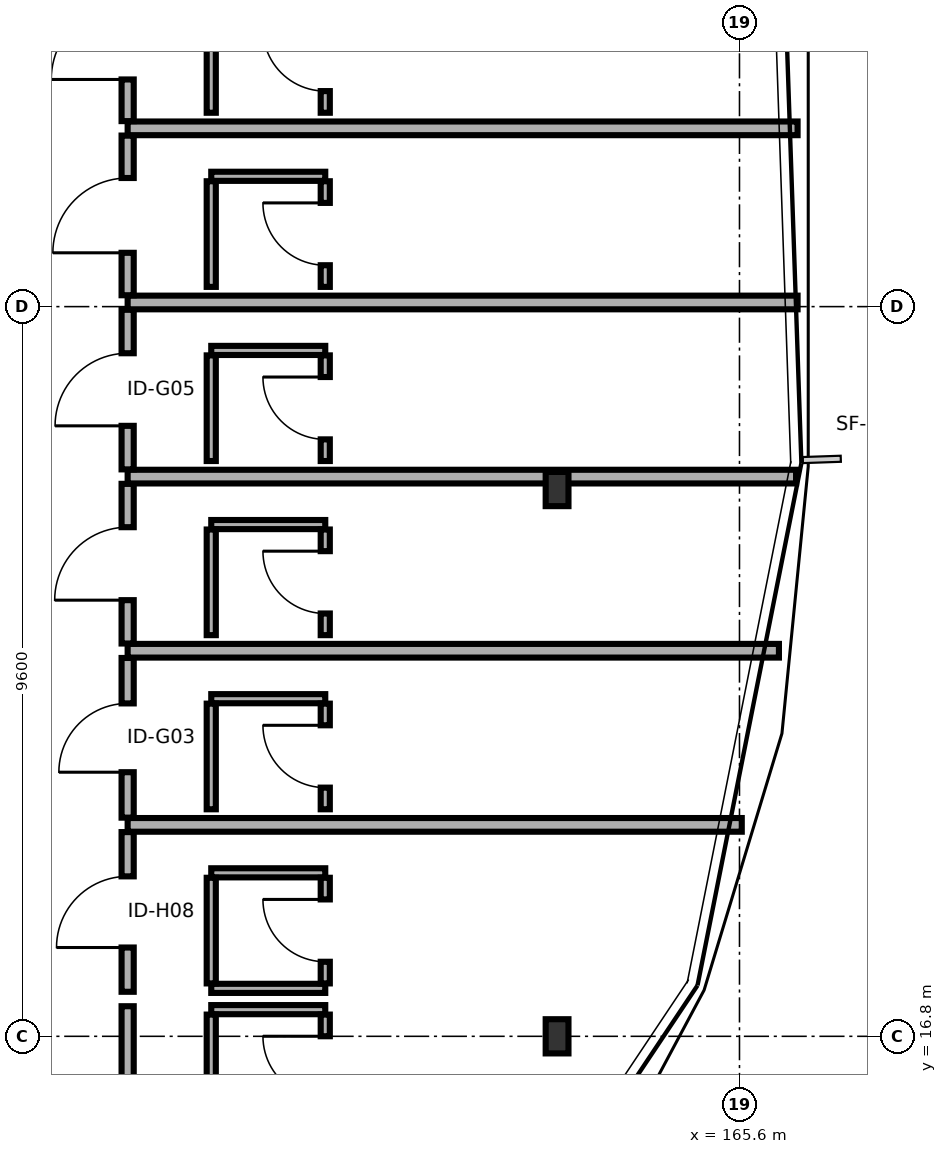
"""IFC4 building model, lengths in metres.
Left out: names, types, materials, properties, quantities, classifications, styles, units other than length and angle.
Written with IfcOpenShell. Run it as: python <this file> out.ifc"""

import sys

from ifc_helpers import new_model, si_unit, direction, frame, frame_2d, origin, origin_2d, place, context, subcontext, project, spatial, rectangle, i_section, extrude, element, fill, save


model = new_model("IFC4")
c1 = context("Model", 3, precision=1e-05, world=origin(), true_north=direction((0.0, 1.0)))
c2 = subcontext(c1, "Body", "Model", "MODEL_VIEW")
j1 = project(units=[si_unit("LENGTHUNIT", "METRE"), si_unit("PLANEANGLEUNIT", "RADIAN")], contexts=[c1])
p1 = place(None, origin())
s1 = spatial("IfcSite", under=j1, at=p1, CompositionType="ELEMENT")
p2 = place(p1, origin())
s2 = spatial("IfcBuilding", under=s1, at=p2, CompositionType="ELEMENT")
p3 = place(p2, frame((0.0, 0.0, 28.3)))
s3 = spatial("IfcBuildingStorey", under=s2, at=p3, CompositionType="ELEMENT", Elevation=28.3)
for number, where, z_axis, x_axis in (
    (1, (163.2, 16.8, 0.0), (0.0, 0.0, 1.0), (1.0, 0.0, 0.0)),
    (2, (163.2, 24.0, 0.0), (0.0, 0.0, 1.0), (1.0, 0.0, 0.0)),
):
    element("IfcColumn", number, at=place(p3, frame(where, z_axis=z_axis, x_axis=x_axis)), inside=s3, PredefinedType="COLUMN", context=c2, shape_type="SweptSolid", body=[
        extrude(i_section(OverallWidth=0.3, OverallDepth=0.45, WebThickness=0.014, FlangeThickness=0.026, FilletRadius=0.027, at=origin_2d()), origin(), (0.0, 0.0, 1.0), 3.4),
    ])
p4 = place(p3, frame((157.55, 15.095, 0.0), z_axis=(0.0, 0.0, 1.0), x_axis=(0.0, 1.0, 0.0)))
e3 = element("IfcWall", 3, at=p4, inside=s3, PredefinedType="PARTITIONING", context=c2, shape_type="SweptSolid", body=[
    extrude(rectangle(XDim=2.101, YDim=0.16, at=frame_2d((1.05, 0.0))), origin(), (0.0, 0.0, 1.0), 2.71),
])
p5 = place(p4, frame((0.16, 0.0, 0.0)))
e4 = element("IfcOpeningElement", 4, at=p5, cuts=e3, PredefinedType="OPENING", context=c2, shape_type="SweptSolid", body=[
    extrude(rectangle(XDim=0.855, YDim=2.05, at=frame_2d((0.427, 1.025))), frame((0.0, 0.09, 0.0), z_axis=(0.0, -1.0, 0.0), x_axis=(1.0, 0.0, 0.0)), (0.0, 0.0, 1.0), 0.18),
])
p6 = place(p3, frame((158.65, 17.151, 0.0), z_axis=(0.0, 0.0, 1.0), x_axis=(1.0, 0.0, 0.0)))
e5 = element("IfcWall", 5, at=p6, inside=s3, PredefinedType="PARTITIONING", context=c2, shape_type="SweptSolid", body=[
    extrude(rectangle(XDim=1.5, YDim=0.12, at=frame_2d((0.75, 0.0))), origin(), (0.0, 0.0, 1.0), 3.175),
])
p7 = place(p3, frame((158.65, 15.696, 0.0), z_axis=(0.0, 0.0, 1.0), x_axis=(0.0, 1.0, 0.0)))
e6 = element("IfcWall", 6, at=p7, inside=s3, PredefinedType="PARTITIONING", context=c2, shape_type="SweptSolid", body=[
    extrude(rectangle(XDim=1.39, YDim=0.12, at=frame_2d((0.695, 0.0))), origin(), (0.0, 0.0, 1.0), 2.71),
])
p8 = place(p3, frame((160.15, 15.696, 0.0), z_axis=(0.0, 0.0, 1.0), x_axis=(0.0, 1.0, 0.0)))
e7 = element("IfcWall", 7, at=p8, inside=s3, PredefinedType="PARTITIONING", context=c2, shape_type="SweptSolid", body=[
    extrude(rectangle(XDim=1.39, YDim=0.12, at=frame_2d((0.695, 0.0))), origin(), (0.0, 0.0, 1.0), 2.71),
])
p9 = place(p8, frame((0.285, 0.0, 0.0)))
e8 = element("IfcOpeningElement", 8, at=p9, cuts=e7, PredefinedType="OPENING", context=c2, shape_type="SweptSolid", body=[
    extrude(rectangle(XDim=0.82, YDim=2.08, at=frame_2d((0.41, 1.04))), frame((0.0, 0.07, 0.0), z_axis=(0.0, -1.0, 0.0), x_axis=(1.0, 0.0, 0.0)), (0.0, 0.0, 1.0), 0.14),
])
p10 = place(p3, frame((157.55, 17.386, 0.0), z_axis=(0.0, 0.0, 1.0), x_axis=(0.0, 1.0, 0.0)))
e9 = element("IfcWall", 9, at=p10, inside=s3, PredefinedType="PARTITIONING", context=c2, shape_type="SweptSolid", body=[
    extrude(rectangle(XDim=2.101, YDim=0.16, at=frame_2d((1.05, 0.0))), origin(), (0.0, 0.0, 1.0), 3.175),
])
p11 = place(p10, frame((0.583, 0.0, 0.0)))
e10 = element("IfcOpeningElement", 10, at=p11, cuts=e9, PredefinedType="OPENING", context=c2, shape_type="SweptSolid", body=[
    extrude(rectangle(XDim=0.936, YDim=2.07, at=frame_2d((0.468, 1.035))), frame((0.0, 0.09, 0.0), z_axis=(0.0, -1.0, 0.0), x_axis=(1.0, 0.0, 0.0)), (0.0, 0.0, 1.0), 0.18),
])
for number, where, z_axis, x_axis in (
    (11, (158.65, 17.431, 0.0), (0.0, 0.0, 1.0), (1.0, 0.0, 0.0)),
    (12, (158.65, 18.951, 0.0), (0.0, 0.0, 1.0), (1.0, 0.0, 0.0)),
):
    element("IfcWall", number, at=place(p3, frame(where, z_axis=z_axis, x_axis=x_axis)), inside=s3, PredefinedType="PARTITIONING", context=c2, shape_type="SweptSolid", body=[
        extrude(rectangle(XDim=1.5, YDim=0.12, at=frame_2d((0.75, 0.0))), origin(), (0.0, 0.0, 1.0), 3.175),
    ])
p12 = place(p3, frame((158.65, 17.496, 0.0), z_axis=(0.0, 0.0, 1.0), x_axis=(0.0, 1.0, 0.0)))
e13 = element("IfcWall", 13, at=p12, inside=s3, PredefinedType="PARTITIONING", context=c2, shape_type="SweptSolid", body=[
    extrude(rectangle(XDim=1.39, YDim=0.12, at=frame_2d((0.695, 0.0))), origin(), (0.0, 0.0, 1.0), 3.175),
])
p13 = place(p3, frame((160.15, 17.496, 0.0), z_axis=(0.0, 0.0, 1.0), x_axis=(0.0, 1.0, 0.0)))
e14 = element("IfcWall", 14, at=p13, inside=s3, PredefinedType="PARTITIONING", context=c2, shape_type="SweptSolid", body=[
    extrude(rectangle(XDim=1.39, YDim=0.12, at=frame_2d((0.695, 0.0))), origin(), (0.0, 0.0, 1.0), 3.175),
])
p14 = place(p13, frame((0.285, 0.0, 0.0)))
e15 = element("IfcOpeningElement", 15, at=p14, cuts=e14, PredefinedType="OPENING", context=c2, shape_type="SweptSolid", body=[
    extrude(rectangle(XDim=0.82, YDim=2.08, at=frame_2d((0.41, 1.04))), frame((0.0, 0.07, 0.0), z_axis=(0.0, -1.0, 0.0), x_axis=(1.0, 0.0, 0.0)), (0.0, 0.0, 1.0), 0.14),
])
p15 = place(p3, frame((157.55, 19.582, 0.0), z_axis=(0.0, 0.0, 1.0), x_axis=(1.0, 0.0, 0.0)))
e16 = element("IfcWall", 16, at=p15, inside=s3, PredefinedType="PARTITIONING", context=c2, shape_type="SweptSolid", body=[
    extrude(rectangle(XDim=8.08, YDim=0.18, at=frame_2d((4.04, 0.0))), origin(), (0.0, 0.0, 1.0), 2.66),
])
p16 = place(p3, frame((157.55, 19.677, 0.0), z_axis=(0.0, 0.0, 1.0), x_axis=(0.0, 1.0, 0.0)))
e17 = element("IfcWall", 17, at=p16, inside=s3, PredefinedType="PARTITIONING", context=c2, shape_type="SweptSolid", body=[
    extrude(rectangle(XDim=2.101, YDim=0.16, at=frame_2d((1.05, 0.0))), origin(), (0.0, 0.0, 1.0), 3.175),
])
p17 = place(p16, frame((0.598, 0.0, 0.0)))
e18 = element("IfcOpeningElement", 18, at=p17, cuts=e17, PredefinedType="OPENING", context=c2, shape_type="SweptSolid", body=[
    extrude(rectangle(XDim=0.905, YDim=2.05, at=frame_2d((0.453, 1.025))), frame((0.0, 0.09, 0.0), z_axis=(0.0, -1.0, 0.0), x_axis=(1.0, 0.0, 0.0)), (0.0, 0.0, 1.0), 0.18),
])
p18 = place(p3, frame((158.65, 21.242, 0.0), z_axis=(0.0, 0.0, 1.0), x_axis=(1.0, 0.0, 0.0)))
e19 = element("IfcWall", 19, at=p18, inside=s3, PredefinedType="PARTITIONING", context=c2, shape_type="SweptSolid", body=[
    extrude(rectangle(XDim=1.5, YDim=0.12, at=frame_2d((0.75, 0.0))), origin(), (0.0, 0.0, 1.0), 3.175),
])
p19 = place(p3, frame((158.65, 19.787, 0.0), z_axis=(0.0, 0.0, 1.0), x_axis=(0.0, 1.0, 0.0)))
e20 = element("IfcWall", 20, at=p19, inside=s3, PredefinedType="PARTITIONING", context=c2, shape_type="SweptSolid", body=[
    extrude(rectangle(XDim=1.39, YDim=0.12, at=frame_2d((0.695, 0.0))), origin(), (0.0, 0.0, 1.0), 3.175),
])
p20 = place(p3, frame((160.15, 19.787, 0.0), z_axis=(0.0, 0.0, 1.0), x_axis=(0.0, 1.0, 0.0)))
e21 = element("IfcWall", 21, at=p20, inside=s3, PredefinedType="PARTITIONING", context=c2, shape_type="SweptSolid", body=[
    extrude(rectangle(XDim=1.39, YDim=0.12, at=frame_2d((0.695, 0.0))), origin(), (0.0, 0.0, 1.0), 3.175),
])
p21 = place(p20, frame((0.285, 0.0, 0.0)))
e22 = element("IfcOpeningElement", 22, at=p21, cuts=e21, PredefinedType="OPENING", context=c2, shape_type="SweptSolid", body=[
    extrude(rectangle(XDim=0.82, YDim=2.08, at=frame_2d((0.41, 1.04))), frame((0.0, 0.07, 0.0), z_axis=(0.0, -1.0, 0.0), x_axis=(1.0, 0.0, 0.0)), (0.0, 0.0, 1.0), 0.14),
])
p22 = place(p3, frame((157.55, 21.873, 0.0), z_axis=(0.0, 0.0, 1.0), x_axis=(1.0, 0.0, 0.0)))
e23 = element("IfcWall", 23, at=p22, inside=s3, PredefinedType="PARTITIONING", context=c2, shape_type="SweptSolid", body=[
    extrude(rectangle(XDim=8.569, YDim=0.18, at=frame_2d((4.284, 0.0))), origin(), (0.0, 0.0, 1.0), 2.66),
])
p23 = place(p3, frame((157.55, 21.968, 0.0), z_axis=(0.0, 0.0, 1.0), x_axis=(0.0, 1.0, 0.0)))
e24 = element("IfcWall", 24, at=p23, inside=s3, PredefinedType="PARTITIONING", context=c2, shape_type="SweptSolid", body=[
    extrude(rectangle(XDim=2.101, YDim=0.16, at=frame_2d((1.05, 0.0))), origin(), (0.0, 0.0, 1.0), 2.71),
])
p24 = place(p23, frame((0.57, 0.0, 0.0)))
e25 = element("IfcOpeningElement", 25, at=p24, cuts=e24, PredefinedType="OPENING", context=c2, shape_type="SweptSolid", body=[
    extrude(rectangle(XDim=0.96, YDim=2.13, at=frame_2d((0.48, 1.065))), frame((0.0, 0.09, 0.0), z_axis=(0.0, -1.0, 0.0), x_axis=(1.0, 0.0, 0.0)), (0.0, 0.0, 1.0), 0.18),
])
p25 = place(p3, frame((158.65, 23.533, 0.0), z_axis=(0.0, 0.0, 1.0), x_axis=(1.0, 0.0, 0.0)))
e26 = element("IfcWall", 26, at=p25, inside=s3, PredefinedType="PARTITIONING", context=c2, shape_type="SweptSolid", body=[
    extrude(rectangle(XDim=1.5, YDim=0.12, at=frame_2d((0.75, 0.0))), origin(), (0.0, 0.0, 1.0), 3.175),
])
p26 = place(p3, frame((158.65, 22.078, 0.0), z_axis=(0.0, 0.0, 1.0), x_axis=(0.0, 1.0, 0.0)))
e27 = element("IfcWall", 27, at=p26, inside=s3, PredefinedType="PARTITIONING", context=c2, shape_type="SweptSolid", body=[
    extrude(rectangle(XDim=1.39, YDim=0.12, at=frame_2d((0.695, 0.0))), origin(), (0.0, 0.0, 1.0), 3.175),
])
p27 = place(p3, frame((160.15, 22.078, 0.0), z_axis=(0.0, 0.0, 1.0), x_axis=(0.0, 1.0, 0.0)))
e28 = element("IfcWall", 28, at=p27, inside=s3, PredefinedType="PARTITIONING", context=c2, shape_type="SweptSolid", body=[
    extrude(rectangle(XDim=1.39, YDim=0.12, at=frame_2d((0.695, 0.0))), origin(), (0.0, 0.0, 1.0), 3.175),
])
p28 = place(p27, frame((0.285, 0.0, 0.0)))
e29 = element("IfcOpeningElement", 29, at=p28, cuts=e28, PredefinedType="OPENING", context=c2, shape_type="SweptSolid", body=[
    extrude(rectangle(XDim=0.82, YDim=2.08, at=frame_2d((0.41, 1.04))), frame((0.0, 0.07, 0.0), z_axis=(0.0, -1.0, 0.0), x_axis=(1.0, 0.0, 0.0)), (0.0, 0.0, 1.0), 0.14),
])
p29 = place(p3, frame((157.55, 24.164, 0.0), z_axis=(0.0, 0.0, 1.0), x_axis=(1.0, 0.0, 0.0)))
e30 = element("IfcWall", 30, at=p29, inside=s3, PredefinedType="PARTITIONING", context=c2, shape_type="SweptSolid", body=[
    extrude(rectangle(XDim=8.794, YDim=0.18, at=frame_2d((4.397, 0.0))), origin(), (0.0, 0.0, 1.0), 2.66),
])
p30 = place(p3, frame((157.55, 24.259, 0.0), z_axis=(0.0, 0.0, 1.0), x_axis=(0.0, 1.0, 0.0)))
e31 = element("IfcWall", 31, at=p30, inside=s3, PredefinedType="PARTITIONING", context=c2, shape_type="SweptSolid", body=[
    extrude(rectangle(XDim=2.101, YDim=0.16, at=frame_2d((1.051, 0.0))), origin(), (0.0, 0.0, 1.0), 3.175),
])
p31 = place(p30, frame((0.573, 0.0, 0.0)))
e32 = element("IfcOpeningElement", 32, at=p31, cuts=e31, PredefinedType="OPENING", context=c2, shape_type="SweptSolid", body=[
    extrude(rectangle(XDim=0.955, YDim=2.05, at=frame_2d((0.478, 1.025))), frame((0.0, 0.09, 0.0), z_axis=(0.0, -1.0, 0.0), x_axis=(1.0, 0.0, 0.0)), (0.0, 0.0, 1.0), 0.18),
])
p32 = place(p3, frame((158.65, 25.823, 0.0), z_axis=(0.0, 0.0, 1.0), x_axis=(1.0, 0.0, 0.0)))
e33 = element("IfcWall", 33, at=p32, inside=s3, PredefinedType="PARTITIONING", context=c2, shape_type="SweptSolid", body=[
    extrude(rectangle(XDim=1.5, YDim=0.12, at=frame_2d((0.75, 0.0))), origin(), (0.0, 0.0, 1.0), 3.175),
])
p33 = place(p3, frame((158.65, 24.369, 0.0), z_axis=(0.0, 0.0, 1.0), x_axis=(0.0, 1.0, 0.0)))
e34 = element("IfcWall", 34, at=p33, inside=s3, PredefinedType="PARTITIONING", context=c2, shape_type="SweptSolid", body=[
    extrude(rectangle(XDim=1.39, YDim=0.12, at=frame_2d((0.695, 0.0))), origin(), (0.0, 0.0, 1.0), 3.175),
])
p34 = place(p3, frame((160.15, 24.369, 0.0), z_axis=(0.0, 0.0, 1.0), x_axis=(0.0, 1.0, 0.0)))
e35 = element("IfcWall", 35, at=p34, inside=s3, PredefinedType="PARTITIONING", context=c2, shape_type="SweptSolid", body=[
    extrude(rectangle(XDim=1.39, YDim=0.12, at=frame_2d((0.695, 0.0))), origin(), (0.0, 0.0, 1.0), 3.175),
])
p35 = place(p34, frame((0.285, 0.0, 0.0)))
e36 = element("IfcOpeningElement", 36, at=p35, cuts=e35, PredefinedType="OPENING", context=c2, shape_type="SweptSolid", body=[
    extrude(rectangle(XDim=0.82, YDim=2.08, at=frame_2d((0.41, 1.04))), frame((0.0, 0.07, 0.0), z_axis=(0.0, -1.0, 0.0), x_axis=(1.0, 0.0, 0.0)), (0.0, 0.0, 1.0), 0.14),
])
p36 = place(p3, frame((157.55, 26.455, 0.0), z_axis=(0.0, 0.0, 1.0), x_axis=(1.0, 0.0, 0.0)))
e37 = element("IfcWall", 37, at=p36, inside=s3, PredefinedType="PARTITIONING", context=c2, shape_type="SweptSolid", body=[
    extrude(rectangle(XDim=8.814, YDim=0.18, at=frame_2d((4.407, 0.0))), origin(), (0.0, 0.0, 1.0), 2.66),
])
p37 = place(p3, frame((157.55, 26.55, 0.0), z_axis=(0.0, 0.0, 1.0), x_axis=(0.0, 1.0, 0.0)))
e38 = element("IfcWall", 38, at=p37, inside=s3, PredefinedType="PARTITIONING", context=c2, shape_type="SweptSolid", body=[
    extrude(rectangle(XDim=2.101, YDim=0.16, at=frame_2d((1.05, 0.0))), origin(), (0.0, 0.0, 1.0), 3.175),
])
p38 = place(p37, frame((0.559, 0.0, 0.0)))
e39 = element("IfcOpeningElement", 39, at=p38, cuts=e38, PredefinedType="OPENING", context=c2, shape_type="SweptSolid", body=[
    extrude(rectangle(XDim=0.984, YDim=2.07, at=frame_2d((0.492, 1.035))), frame((0.0, 0.09, 0.0), z_axis=(0.0, -1.0, 0.0), x_axis=(1.0, 0.0, 0.0)), (0.0, 0.0, 1.0), 0.18),
])
p39 = place(p3, frame((158.65, 28.115, 0.0), z_axis=(0.0, 0.0, 1.0), x_axis=(1.0, 0.0, 0.0)))
e40 = element("IfcWall", 40, at=p39, inside=s3, PredefinedType="PARTITIONING", context=c2, shape_type="SweptSolid", body=[
    extrude(rectangle(XDim=1.5, YDim=0.12, at=frame_2d((0.75, 0.0))), origin(), (0.0, 0.0, 1.0), 3.175),
])
p40 = place(p3, frame((158.65, 26.659, 0.0), z_axis=(0.0, 0.0, 1.0), x_axis=(0.0, 1.0, 0.0)))
e41 = element("IfcWall", 41, at=p40, inside=s3, PredefinedType="PARTITIONING", context=c2, shape_type="SweptSolid", body=[
    extrude(rectangle(XDim=1.39, YDim=0.12, at=frame_2d((0.695, 0.0))), origin(), (0.0, 0.0, 1.0), 3.175),
])
p41 = place(p3, frame((160.15, 26.659, 0.0), z_axis=(0.0, 0.0, 1.0), x_axis=(0.0, 1.0, 0.0)))
e42 = element("IfcWall", 42, at=p41, inside=s3, PredefinedType="PARTITIONING", context=c2, shape_type="SweptSolid", body=[
    extrude(rectangle(XDim=1.39, YDim=0.12, at=frame_2d((0.695, 0.0))), origin(), (0.0, 0.0, 1.0), 3.175),
])
p42 = place(p41, frame((0.285, 0.0, 0.0)))
e43 = element("IfcOpeningElement", 43, at=p42, cuts=e42, PredefinedType="OPENING", context=c2, shape_type="SweptSolid", body=[
    extrude(rectangle(XDim=0.82, YDim=2.08, at=frame_2d((0.41, 1.04))), frame((0.0, 0.07, 0.0), z_axis=(0.0, -1.0, 0.0), x_axis=(1.0, 0.0, 0.0)), (0.0, 0.0, 1.0), 0.14),
])
p43 = place(p3, frame((157.55, 28.746, 0.0), z_axis=(0.0, 0.0, 1.0), x_axis=(1.0, 0.0, 0.0)))
e44 = element("IfcWall", 44, at=p43, inside=s3, PredefinedType="PARTITIONING", context=c2, shape_type="SweptSolid", body=[
    extrude(rectangle(XDim=8.814, YDim=0.18, at=frame_2d((4.407, 0.0))), origin(), (0.0, 0.0, 1.0), 2.66),
])
p44 = place(p3, frame((157.55, 28.841, 0.0), z_axis=(0.0, 0.0, 1.0), x_axis=(0.0, 1.0, 0.0)))
e45 = element("IfcWall", 45, at=p44, inside=s3, PredefinedType="PARTITIONING", context=c2, shape_type="SweptSolid", body=[
    extrude(rectangle(XDim=2.101, YDim=0.16, at=frame_2d((1.05, 0.0))), origin(), (0.0, 0.0, 1.0), 3.175),
])
p45 = place(p44, frame((0.548, 0.0, 0.0)))
e46 = element("IfcOpeningElement", 46, at=p45, cuts=e45, PredefinedType="OPENING", context=c2, shape_type="SweptSolid", body=[
    extrude(rectangle(XDim=1.005, YDim=2.05, at=frame_2d((0.502, 1.025))), frame((0.0, 0.09, 0.0), z_axis=(0.0, -1.0, 0.0), x_axis=(1.0, 0.0, 0.0)), (0.0, 0.0, 1.0), 0.18),
])
p46 = place(p3, frame((158.65, 28.95, 0.0), z_axis=(0.0, 0.0, 1.0), x_axis=(0.0, 1.0, 0.0)))
e47 = element("IfcWall", 47, at=p46, inside=s3, PredefinedType="PARTITIONING", context=c2, shape_type="SweptSolid", body=[
    extrude(rectangle(XDim=1.39, YDim=0.12, at=frame_2d((0.695, 0.0))), origin(), (0.0, 0.0, 1.0), 3.175),
])
p47 = place(p3, frame((160.15, 28.95, 0.0), z_axis=(0.0, 0.0, 1.0), x_axis=(0.0, 1.0, 0.0)))
e48 = element("IfcWall", 48, at=p47, inside=s3, PredefinedType="PARTITIONING", context=c2, shape_type="SweptSolid", body=[
    extrude(rectangle(XDim=1.39, YDim=0.12, at=frame_2d((0.695, 0.0))), origin(), (0.0, 0.0, 1.0), 3.175),
])
p48 = place(p47, frame((0.285, 0.0, 0.0)))
e49 = element("IfcOpeningElement", 49, at=p48, cuts=e48, PredefinedType="OPENING", context=c2, shape_type="SweptSolid", body=[
    extrude(rectangle(XDim=0.82, YDim=2.08, at=frame_2d((0.41, 1.04))), frame((0.0, 0.07, 0.0), z_axis=(0.0, -1.0, 0.0), x_axis=(1.0, 0.0, 0.0)), (0.0, 0.0, 1.0), 0.14),
])
p49 = place(p9, origin())
e50 = element("IfcDoor", 50, at=p49, inside=s3, OperationType="SINGLE_SWING_RIGHT", PredefinedType="DOOR", context=c2, shape_type="SweptSolid", body=[
    extrude(rectangle(XDim=0.82, YDim=2.08, at=frame_2d((0.41, 1.04))), frame((0.0, 0.025, 0.0), z_axis=(0.0, -1.0, 0.0), x_axis=(1.0, 0.0, 0.0)), (0.0, 0.0, 1.0), 0.05),
])
fill(e8, e50)
p50 = place(p11, origin())
e51 = element("IfcDoor", 51, at=p50, inside=s3, OperationType="SINGLE_SWING_LEFT", PredefinedType="DOOR", context=c2, shape_type="SweptSolid", body=[
    extrude(rectangle(XDim=0.936, YDim=2.07, at=frame_2d((0.468, 1.035))), frame((0.0, 0.025, 0.0), z_axis=(0.0, -1.0, 0.0), x_axis=(1.0, 0.0, 0.0)), (0.0, 0.0, 1.0), 0.05),
])
fill(e10, e51)
p51 = place(p14, origin())
e52 = element("IfcDoor", 52, at=p51, inside=s3, OperationType="SINGLE_SWING_RIGHT", PredefinedType="DOOR", context=c2, shape_type="SweptSolid", body=[
    extrude(rectangle(XDim=0.82, YDim=2.08, at=frame_2d((0.41, 1.04))), frame((0.0, 0.025, 0.0), z_axis=(0.0, -1.0, 0.0), x_axis=(1.0, 0.0, 0.0)), (0.0, 0.0, 1.0), 0.05),
])
fill(e15, e52)
p52 = place(p17, origin())
e53 = element("IfcDoor", 53, at=p52, inside=s3, OperationType="SINGLE_SWING_LEFT", PredefinedType="DOOR", context=c2, shape_type="SweptSolid", body=[
    extrude(rectangle(XDim=0.905, YDim=2.05, at=frame_2d((0.453, 1.025))), frame((0.0, 0.025, 0.0), z_axis=(0.0, -1.0, 0.0), x_axis=(1.0, 0.0, 0.0)), (0.0, 0.0, 1.0), 0.05),
])
fill(e18, e53)
p53 = place(p21, origin())
e54 = element("IfcDoor", 54, at=p53, inside=s3, OperationType="SINGLE_SWING_RIGHT", PredefinedType="DOOR", context=c2, shape_type="SweptSolid", body=[
    extrude(rectangle(XDim=0.82, YDim=2.08, at=frame_2d((0.41, 1.04))), frame((0.0, 0.025, 0.0), z_axis=(0.0, -1.0, 0.0), x_axis=(1.0, 0.0, 0.0)), (0.0, 0.0, 1.0), 0.05),
])
fill(e22, e54)
p54 = place(p24, origin())
e55 = element("IfcDoor", 55, at=p54, inside=s3, OperationType="SINGLE_SWING_LEFT", PredefinedType="DOOR", context=c2, shape_type="SweptSolid", body=[
    extrude(rectangle(XDim=0.96, YDim=2.13, at=frame_2d((0.48, 1.065))), frame((0.0, 0.025, 0.0), z_axis=(0.0, -1.0, 0.0), x_axis=(1.0, 0.0, 0.0)), (0.0, 0.0, 1.0), 0.05),
])
fill(e25, e55)
p55 = place(p28, origin())
e56 = element("IfcDoor", 56, at=p55, inside=s3, OperationType="SINGLE_SWING_RIGHT", PredefinedType="DOOR", context=c2, shape_type="SweptSolid", body=[
    extrude(rectangle(XDim=0.82, YDim=2.08, at=frame_2d((0.41, 1.04))), frame((0.0, 0.025, 0.0), z_axis=(0.0, -1.0, 0.0), x_axis=(1.0, 0.0, 0.0)), (0.0, 0.0, 1.0), 0.05),
])
fill(e29, e56)
p56 = place(p31, origin())
e57 = element("IfcDoor", 57, at=p56, inside=s3, OperationType="SINGLE_SWING_LEFT", PredefinedType="DOOR", context=c2, shape_type="SweptSolid", body=[
    extrude(rectangle(XDim=0.955, YDim=2.05, at=frame_2d((0.478, 1.025))), frame((0.0, 0.025, 0.0), z_axis=(0.0, -1.0, 0.0), x_axis=(1.0, 0.0, 0.0)), (0.0, 0.0, 1.0), 0.05),
])
fill(e32, e57)
p57 = place(p35, origin())
e58 = element("IfcDoor", 58, at=p57, inside=s3, OperationType="SINGLE_SWING_RIGHT", PredefinedType="DOOR", context=c2, shape_type="SweptSolid", body=[
    extrude(rectangle(XDim=0.82, YDim=2.08, at=frame_2d((0.41, 1.04))), frame((0.0, 0.025, 0.0), z_axis=(0.0, -1.0, 0.0), x_axis=(1.0, 0.0, 0.0)), (0.0, 0.0, 1.0), 0.05),
])
fill(e36, e58)
p58 = place(p38, origin())
e59 = element("IfcDoor", 59, at=p58, inside=s3, OperationType="SINGLE_SWING_LEFT", PredefinedType="DOOR", context=c2, shape_type="SweptSolid", body=[
    extrude(rectangle(XDim=0.984, YDim=2.07, at=frame_2d((0.492, 1.035))), frame((0.0, 0.025, 0.0), z_axis=(0.0, -1.0, 0.0), x_axis=(1.0, 0.0, 0.0)), (0.0, 0.0, 1.0), 0.05),
])
fill(e39, e59)
p59 = place(p42, origin())
e60 = element("IfcDoor", 60, at=p59, inside=s3, OperationType="SINGLE_SWING_RIGHT", PredefinedType="DOOR", context=c2, shape_type="SweptSolid", body=[
    extrude(rectangle(XDim=0.82, YDim=2.08, at=frame_2d((0.41, 1.04))), frame((0.0, 0.025, 0.0), z_axis=(0.0, -1.0, 0.0), x_axis=(1.0, 0.0, 0.0)), (0.0, 0.0, 1.0), 0.05),
])
fill(e43, e60)
p60 = place(p45, origin())
e61 = element("IfcDoor", 61, at=p60, inside=s3, OperationType="SINGLE_SWING_LEFT", PredefinedType="DOOR", context=c2, shape_type="SweptSolid", body=[
    extrude(rectangle(XDim=1.005, YDim=2.05, at=frame_2d((0.502, 1.025))), frame((0.0, 0.025, 0.0), z_axis=(0.0, -1.0, 0.0), x_axis=(1.0, 0.0, 0.0)), (0.0, 0.0, 1.0), 0.05),
])
fill(e46, e61)
p61 = place(p48, origin())
e62 = element("IfcDoor", 62, at=p61, inside=s3, OperationType="SINGLE_SWING_RIGHT", PredefinedType="DOOR", context=c2, shape_type="SweptSolid", body=[
    extrude(rectangle(XDim=0.82, YDim=2.08, at=frame_2d((0.41, 1.04))), frame((0.0, 0.025, 0.0), z_axis=(0.0, -1.0, 0.0), x_axis=(1.0, 0.0, 0.0)), (0.0, 0.0, 1.0), 0.05),
])
fill(e49, e62)
save(model, sys.argv[1])
